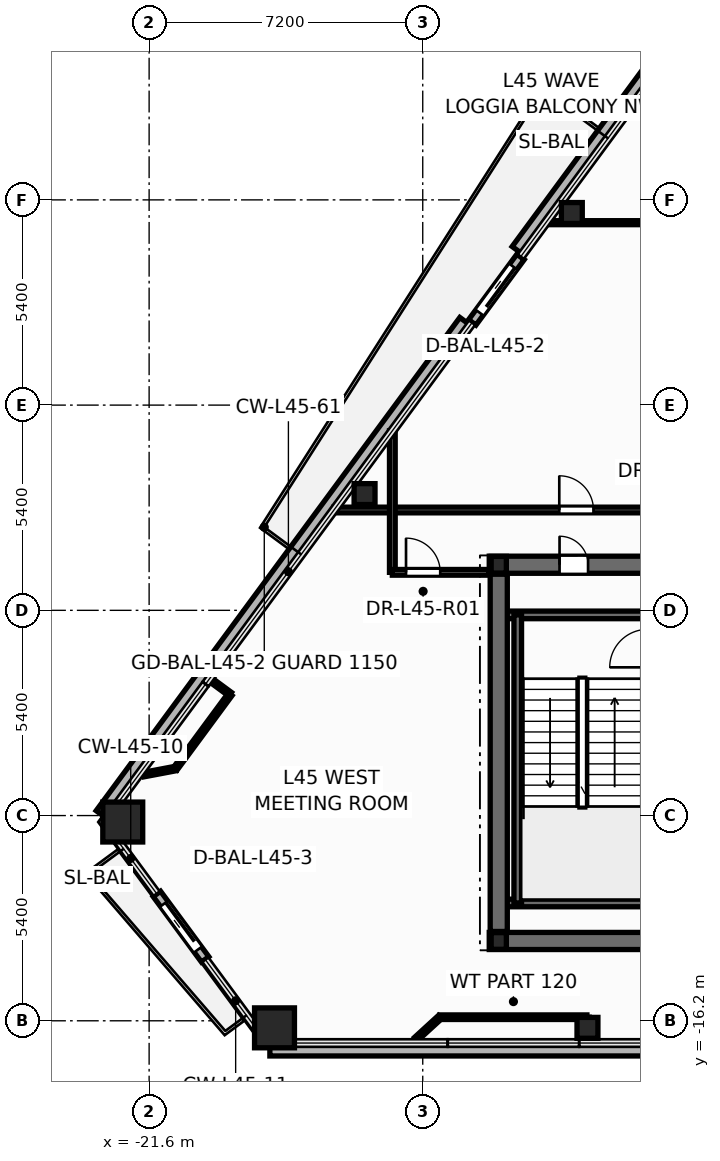
"""IFC4 building model, lengths in metres.
Left out: names, types, materials, properties, quantities, classifications, styles, units other than length and angle.
Written with IfcOpenShell. Run it as: python <this file> out.ifc"""

import sys

from ifc_helpers import new_model, si_unit, direction, frame, frame_2d, origin, origin_2d, place, context, subcontext, project, spatial, rectangle, hollow_rectangle, hollow_circle, i_section, extrude, element, fill, save


model = new_model("IFC4")
c1 = context("Model", 3, precision=1e-05, world=origin(), true_north=direction((0.0, 1.0)))
c2 = subcontext(c1, "Body", "Model", "MODEL_VIEW")
j1 = project(units=[si_unit("LENGTHUNIT", "METRE"), si_unit("PLANEANGLEUNIT", "RADIAN")], contexts=[c1])
p1 = place(None, origin())
s1 = spatial("IfcSite", under=j1, at=p1, CompositionType="ELEMENT")
p2 = place(p1, origin())
s2 = spatial("IfcBuilding", under=s1, at=p2, CompositionType="ELEMENT")
p3 = place(p2, frame((0.0, 0.0, 173.7)))
s3 = spatial("IfcBuildingStorey", under=s2, at=p3, CompositionType="ELEMENT", Elevation=173.7)
for number, where, z_axis, x_axis in (
    (1, (-22.294, -10.97, 0.0), (0.0, 0.0, 1.0), (1.0, 0.0, 0.0)),
    (2, (-18.301, -16.385, 0.0), (0.0, 0.0, 1.0), (1.0, 0.0, 0.0)),
):
    element("IfcColumn", number, at=place(p3, frame(where, z_axis=z_axis, x_axis=x_axis)), inside=s3, PredefinedType="COLUMN", context=c2, shape_type="SweptSolid", body=[
        extrude(hollow_rectangle(XDim=1.05, YDim=1.05, WallThickness=0.045, at=origin_2d()), origin(), (0.0, 0.0, 1.0), 4.8),
    ])
for number, where, z_axis, x_axis in (
    (3, (-10.065, -16.385, 0.0), (0.0, 0.0, 1.0), (1.0, 0.0, 0.0)),
    (4, (-10.477, 5.055, 0.0), (0.0, 0.0, 1.0), (1.0, 0.0, 0.0)),
    (5, (-15.931, -2.341, 0.0), (0.0, 0.0, 1.0), (1.0, 0.0, 0.0)),
):
    element("IfcColumn", number, at=place(p3, frame(where, z_axis=z_axis, x_axis=x_axis)), inside=s3, PredefinedType="COLUMN", context=c2, shape_type="SweptSolid", body=[
        extrude(hollow_circle(Radius=0.275, WallThickness=0.024, at=origin_2d()), origin(), (0.0, 0.0, 1.0), 4.8),
    ])
for number, where, z_axis, x_axis in (
    (6, (-12.4, -14.1, 0.0), (0.0, 0.0, 1.0), (1.0, 0.0, 0.0)),
    (7, (-12.4, -4.2, 0.0), (0.0, 0.0, 1.0), (1.0, 0.0, 0.0)),
):
    element("IfcColumn", number, at=place(p3, frame(where, z_axis=z_axis, x_axis=x_axis)), inside=s3, PredefinedType="COLUMN", context=c2, shape_type="SweptSolid", body=[
        extrude(i_section(OverallWidth=0.4, OverallDepth=0.44, WebThickness=0.028, FlangeThickness=0.04, at=origin_2d()), origin(), (0.0, 0.0, 1.0), 4.8),
    ])
p4 = place(p3, frame((-18.423, -16.946, -0.2), z_axis=(0.0, 0.0, 1.0), x_axis=(1.0, 0.0, 0.0)))
e8 = element("IfcWall", 8, at=p4, inside=s3, PredefinedType="PARAPET", context=c2, shape_type="SweptSolid", body=[
    extrude(rectangle(XDim=36.845, YDim=0.36, at=frame_2d((18.423, 0.0))), origin(), (0.0, 0.0, 1.0), 0.38),
])
p5 = place(p3, frame((-4.516, 14.082, -0.2), z_axis=(0.0, 0.0, 1.0), x_axis=(-0.593482739704, -0.804846716881, 0.0)))
e9 = element("IfcWall", 9, at=p5, inside=s3, PredefinedType="PARAPET", context=c2, shape_type="SweptSolid", body=[
    extrude(rectangle(XDim=12.445, YDim=0.36, at=frame_2d((6.222, 0.0))), origin(), (0.0, 0.0, 1.0), 0.38),
])
p6 = place(p3, frame((-13.279, 2.199, -0.2), z_axis=(0.0, 0.0, 1.0), x_axis=(-0.593480482425, -0.804848381362, 0.0)))
e10 = element("IfcWall", 10, at=p6, inside=s3, PredefinedType="PARAPET", context=c2, shape_type="SweptSolid", body=[
    extrude(rectangle(XDim=16.125, YDim=0.36, at=frame_2d((8.062, 0.0))), origin(), (0.0, 0.0, 1.0), 0.38),
])
p7 = place(p3, frame((-11.826, 3.899, -0.015), z_axis=(0.0, 0.0, 1.0), x_axis=(-0.593537527179, -0.804806314482, 0.0)))
e11 = element("IfcWall", 11, at=p7, inside=s3, PredefinedType="STANDARD", context=c2, shape_type="SweptSolid", body=[
    extrude(rectangle(XDim=2.14, YDim=0.24, at=frame_2d((1.07, 0.0))), origin(), (0.0, 0.0, 1.0), 4.007),
])
p8 = place(p7, frame((0.32, 0.0, 0.015)))
e12 = element("IfcOpeningElement", 12, at=p8, cuts=e11, PredefinedType="OPENING", context=c2, shape_type="SweptSolid", body=[
    extrude(rectangle(XDim=1.506, YDim=2.204, at=frame_2d((0.75, 1.102))), frame((0.0, 0.13, 0.0), z_axis=(0.0, -1.0, 0.0), x_axis=(1.0, 0.0, 0.0)), (0.0, 0.0, 1.0), 0.26),
])
p9 = place(p3, frame((-21.396, -12.862, -0.015), z_axis=(0.0, 0.0, 1.0), x_axis=(0.593463631131, -0.804860806926, 0.0)))
e13 = element("IfcWall", 13, at=p9, inside=s3, PredefinedType="STANDARD", context=c2, shape_type="SweptSolid", body=[
    extrude(rectangle(XDim=2.14, YDim=0.24, at=frame_2d((1.07, 0.0))), origin(), (0.0, 0.0, 1.0), 4.007),
])
p10 = place(p9, frame((0.32, 0.0, 0.015)))
e14 = element("IfcOpeningElement", 14, at=p10, cuts=e13, PredefinedType="OPENING", context=c2, shape_type="SweptSolid", body=[
    extrude(rectangle(XDim=1.506, YDim=2.204, at=frame_2d((0.75, 1.102))), frame((0.0, 0.13, 0.0), z_axis=(0.0, -1.0, 0.0), x_axis=(1.0, 0.0, 0.0)), (0.0, 0.0, 1.0), 0.26),
])
p11 = place(p3, frame((-12.65, -14.1, 0.0), z_axis=(0.0, 0.0, 1.0), x_axis=(1.0, 0.0, 0.0)))
e15 = element("IfcWall", 15, at=p11, inside=s3, PredefinedType="SHEAR", context=c2, shape_type="SweptSolid", body=[
    extrude(rectangle(XDim=25.3, YDim=0.45, at=frame_2d((12.65, 0.0))), origin(), (0.0, 0.0, 1.0), 4.8),
])
p12 = place(p3, frame((-12.65, -4.2, 0.0), z_axis=(0.0, 0.0, 1.0), x_axis=(1.0, 0.0, 0.0)))
e16 = element("IfcWall", 16, at=p12, inside=s3, PredefinedType="SHEAR", context=c2, shape_type="SweptSolid", body=[
    extrude(rectangle(XDim=25.3, YDim=0.45, at=frame_2d((12.65, 0.0))), origin(), (0.0, 0.0, 1.0), 4.8),
])
p13 = place(p12, frame((1.85, 0.0, 0.0)))
e17 = element("IfcOpeningElement", 17, at=p13, cuts=e16, PredefinedType="OPENING", context=c2, shape_type="SweptSolid", body=[
    extrude(rectangle(XDim=0.756, YDim=2.054, at=frame_2d((0.375, 1.027))), frame((0.0, 0.235, 0.0), z_axis=(0.0, -1.0, 0.0), x_axis=(1.0, 0.0, 0.0)), (0.0, 0.0, 1.0), 0.47),
])
p14 = place(p12, frame((22.65, 0.0, 0.0)))
e18 = element("IfcOpeningElement", 18, at=p14, cuts=e16, PredefinedType="OPENING", context=c2, shape_type="SweptSolid", body=[
    extrude(rectangle(XDim=0.756, YDim=2.054, at=frame_2d((0.375, 1.027))), frame((0.0, 0.235, 0.0), z_axis=(0.0, -1.0, 0.0), x_axis=(1.0, 0.0, 0.0)), (0.0, 0.0, 1.0), 0.47),
])
p15 = place(p12, frame((5.85, 0.0, 0.0)))
e19 = element("IfcOpeningElement", 19, at=p15, cuts=e16, PredefinedType="OPENING", context=c2, shape_type="SweptSolid", body=[
    extrude(rectangle(XDim=1.006, YDim=2.104, at=frame_2d((0.5, 1.052))), frame((0.0, 0.235, 0.0), z_axis=(0.0, -1.0, 0.0), x_axis=(1.0, 0.0, 0.0)), (0.0, 0.0, 1.0), 0.47),
])
p16 = place(p12, frame((10.35, 0.0, 0.0)))
e20 = element("IfcOpeningElement", 20, at=p16, cuts=e16, PredefinedType="OPENING", context=c2, shape_type="SweptSolid", body=[
    extrude(rectangle(XDim=1.406, YDim=2.154, at=frame_2d((0.7, 1.077))), frame((0.0, 0.235, 0.0), z_axis=(0.0, -1.0, 0.0), x_axis=(1.0, 0.0, 0.0)), (0.0, 0.0, 1.0), 0.47),
])
p17 = place(p12, frame((18.45, 0.0, 0.0)))
e21 = element("IfcOpeningElement", 21, at=p17, cuts=e16, PredefinedType="OPENING", context=c2, shape_type="SweptSolid", body=[
    extrude(rectangle(XDim=1.006, YDim=2.104, at=frame_2d((0.5, 1.052))), frame((0.0, 0.235, 0.0), z_axis=(0.0, -1.0, 0.0), x_axis=(1.0, 0.0, 0.0)), (0.0, 0.0, 1.0), 0.47),
])
for number, where, z_axis, x_axis in (
    (22, (-12.35, -5.52, 0.0), (0.0, 0.0, 1.0), (1.0, 0.0, 0.0)),
    (23, (-12.35, -13.1, 0.0), (0.0, 0.0, 1.0), (1.0, 0.0, 0.0)),
):
    element("IfcWall", number, at=place(p3, frame(where, z_axis=z_axis, x_axis=x_axis)), inside=s3, PredefinedType="SOLIDWALL", context=c2, shape_type="SweptSolid", body=[
        extrude(rectangle(XDim=3.87, YDim=0.2, at=frame_2d((1.935, 0.0))), origin(), (0.0, 0.0, 1.0), 4.8),
    ])
p18 = place(p3, frame((-11.9, -13.1, 0.0), z_axis=(0.0, 0.0, 1.0), x_axis=(0.0, 1.0, 0.0)))
e24 = element("IfcWall", 24, at=p18, inside=s3, PredefinedType="SOLIDWALL", context=c2, shape_type="SweptSolid", body=[
    extrude(rectangle(XDim=7.58, YDim=0.2, at=frame_2d((3.79, 0.0))), origin(), (0.0, 0.0, 1.0), 4.8),
])
p19 = place(p3, frame((-12.4, -13.85, 0.0), z_axis=(0.0, 0.0, 1.0), x_axis=(0.0, 1.0, 0.0)))
e25 = element("IfcWall", 25, at=p19, inside=s3, PredefinedType="SHEAR", context=c2, shape_type="SweptSolid", body=[
    extrude(rectangle(XDim=9.4, YDim=0.45, at=frame_2d((4.7, 0.0))), origin(), (0.0, 0.0, 1.0), 4.8),
])
p20 = place(p3, frame((-16.737, -2.76, 0.0), z_axis=(0.0, 0.0, 1.0), x_axis=(1.0, 0.0, 0.0)))
e26 = element("IfcWall", 26, at=p20, inside=s3, PredefinedType="PARTITIONING", context=c2, shape_type="SweptSolid", body=[
    extrude(rectangle(XDim=14.656, YDim=0.15, at=frame_2d((7.328, 0.0))), origin(), (0.0, 0.0, 1.0), 3.525),
])
p21 = place(p20, frame((5.929, 0.0, 0.0)))
e27 = element("IfcOpeningElement", 27, at=p21, cuts=e26, PredefinedType="OPENING", context=c2, shape_type="SweptSolid", body=[
    extrude(rectangle(XDim=0.906, YDim=2.104, at=frame_2d((0.45, 1.052))), frame((0.0, 0.085, 0.0), z_axis=(0.0, -1.0, 0.0), x_axis=(1.0, 0.0, 0.0)), (0.0, 0.0, 1.0), 0.17),
])
p22 = place(p3, frame((-11.162, 4.8, 0.0), z_axis=(0.0, 0.0, 1.0), x_axis=(1.0, 0.0, 0.0)))
e28 = element("IfcWall", 28, at=p22, inside=s3, PredefinedType="PARTITIONING", context=c2, shape_type="SweptSolid", body=[
    extrude(rectangle(XDim=11.802, YDim=0.105, at=frame_2d((5.901, 0.0))), origin(), (0.0, 0.0, 1.0), 3.525),
])
p23 = place(p3, frame((-13.948, -16.106, 0.0), z_axis=(0.0, 0.0, 1.0), x_axis=(1.0, 0.0, 0.0)))
e29 = element("IfcWall", 29, at=p23, inside=s3, PredefinedType="PARTITIONING", context=c2, shape_type="SweptSolid", body=[
    extrude(rectangle(XDim=3.868, YDim=0.12, at=frame_2d((1.934, 0.0))), origin(), (0.0, 0.0, 1.0), 3.992),
])
p24 = place(p3, frame((-15.2, -4.4, 0.0), z_axis=(0.0, 0.0, 1.0), x_axis=(0.0, 1.0, 0.0)))
e30 = element("IfcWall", 30, at=p24, inside=s3, PredefinedType="PARTITIONING", context=c2, shape_type="SweptSolid", body=[
    extrude(rectangle(XDim=3.724, YDim=0.15, at=frame_2d((1.862, 0.0))), origin(), (0.0, 0.0, 1.0), 3.825),
])
p25 = place(p3, frame((-15.2, -4.4, 0.0), z_axis=(0.0, 0.0, 1.0), x_axis=(1.0, 0.0, 0.0)))
e31 = element("IfcWall", 31, at=p25, inside=s3, PredefinedType="PARTITIONING", context=c2, shape_type="SweptSolid", body=[
    extrude(rectangle(XDim=2.548, YDim=0.15, at=frame_2d((1.274, 0.0))), origin(), (0.0, 0.0, 1.0), 3.525),
])
p26 = place(p25, frame((0.36, 0.0, 0.0)))
e32 = element("IfcOpeningElement", 32, at=p26, cuts=e31, PredefinedType="OPENING", context=c2, shape_type="SweptSolid", body=[
    extrude(rectangle(XDim=0.906, YDim=2.104, at=frame_2d((0.45, 1.052))), frame((0.0, 0.085, 0.0), z_axis=(0.0, -1.0, 0.0), x_axis=(1.0, 0.0, 0.0)), (0.0, 0.0, 1.0), 0.17),
])
p27 = place(p3, frame((-19.467, -7.608, 0.0), z_axis=(0.0, 0.0, 1.0), x_axis=(-0.593469747426, -0.804856297043, 0.0)))
e33 = element("IfcWall", 33, at=p27, inside=s3, PredefinedType="PARTITIONING", context=c2, shape_type="SweptSolid", body=[
    extrude(rectangle(XDim=2.43, YDim=0.12, at=frame_2d((1.215, 0.0))), origin(), (0.0, 0.0, 1.0), 4.55),
])
for number, where, z_axis, x_axis in (
    (34, (-14.575, -16.68, 0.0), (0.0, 0.0, 1.0), (0.738, 0.675, 0.0)),
    (35, (-20.909, -9.564, 0.0), (0.0, 0.0, 1.0), (-0.983, -0.186, 0.0)),
):
    element("IfcWall", number, at=place(p3, frame(where, z_axis=z_axis, x_axis=x_axis)), inside=s3, PredefinedType="PARTITIONING", context=c2, shape_type="SweptSolid", body=[
        extrude(rectangle(XDim=0.851, YDim=0.12, at=frame_2d((0.425, 0.0))), origin(), (0.0, 0.0, 1.0), 3.992),
    ])
for number, where, z_axis, x_axis in (
    (36, (-10.08, -16.106, 0.0), (0.0, 0.0, 1.0), (0.0, -1.0, 0.0)),
    (37, (-20.006, -7.211, 0.0), (0.0, 0.0, 1.0), (0.805, -0.593, 0.0)),
):
    element("IfcWall", number, at=place(p3, frame(where, z_axis=z_axis, x_axis=x_axis)), inside=s3, PredefinedType="PARTITIONING", context=c2, shape_type="SweptSolid", body=[
        extrude(rectangle(XDim=0.67, YDim=0.12, at=frame_2d((0.335, 0.0))), origin(), (0.0, 0.0, 1.0), 3.992),
    ])
p28 = place(p8, origin())
e38 = element("IfcDoor", 38, at=p28, inside=s3, OperationType="SLIDING_TO_RIGHT", PredefinedType="DOOR", context=c2, shape_type="SweptSolid", body=[
    extrude(rectangle(XDim=1.5, YDim=2.2, at=frame_2d((0.75, 1.1))), frame((0.0, 0.025, 0.0), z_axis=(0.0, -1.0, 0.0), x_axis=(1.0, 0.0, 0.0)), (0.0, 0.0, 1.0), 0.05),
])
fill(e12, e38)
p29 = place(p10, origin())
e39 = element("IfcDoor", 39, at=p29, inside=s3, OperationType="SLIDING_TO_RIGHT", PredefinedType="DOOR", context=c2, shape_type="SweptSolid", body=[
    extrude(rectangle(XDim=1.5, YDim=2.2, at=frame_2d((0.75, 1.1))), frame((0.0, 0.025, 0.0), z_axis=(0.0, -1.0, 0.0), x_axis=(1.0, 0.0, 0.0)), (0.0, 0.0, 1.0), 0.05),
])
fill(e14, e39)
p30 = place(p13, origin())
e40 = element("IfcDoor", 40, at=p30, inside=s3, OperationType="SINGLE_SWING_LEFT", PredefinedType="DOOR", context=c2, shape_type="SweptSolid", body=[
    extrude(rectangle(XDim=0.75, YDim=2.05, at=frame_2d((0.375, 1.025))), frame((0.0, 0.025, 0.0), z_axis=(0.0, -1.0, 0.0), x_axis=(1.0, 0.0, 0.0)), (0.0, 0.0, 1.0), 0.05),
])
fill(e17, e40)
p31 = place(p26, origin())
e41 = element("IfcDoor", 41, at=p31, inside=s3, OperationType="SINGLE_SWING_LEFT", PredefinedType="DOOR", context=c2, shape_type="SweptSolid", body=[
    extrude(rectangle(XDim=0.9, YDim=2.1, at=frame_2d((0.45, 1.05))), frame((0.0, 0.025, 0.0), z_axis=(0.0, -1.0, 0.0), x_axis=(1.0, 0.0, 0.0)), (0.0, 0.0, 1.0), 0.05),
])
fill(e32, e41)
p32 = place(p21, origin())
e42 = element("IfcDoor", 42, at=p32, inside=s3, OperationType="SINGLE_SWING_LEFT", PredefinedType="DOOR", context=c2, shape_type="SweptSolid", body=[
    extrude(rectangle(XDim=0.9, YDim=2.1, at=frame_2d((0.45, 1.05))), frame((0.0, 0.025, 0.0), z_axis=(0.0, -1.0, 0.0), x_axis=(1.0, 0.0, 0.0)), (0.0, 0.0, 1.0), 0.05),
])
fill(e27, e42)
save(model, sys.argv[1])
